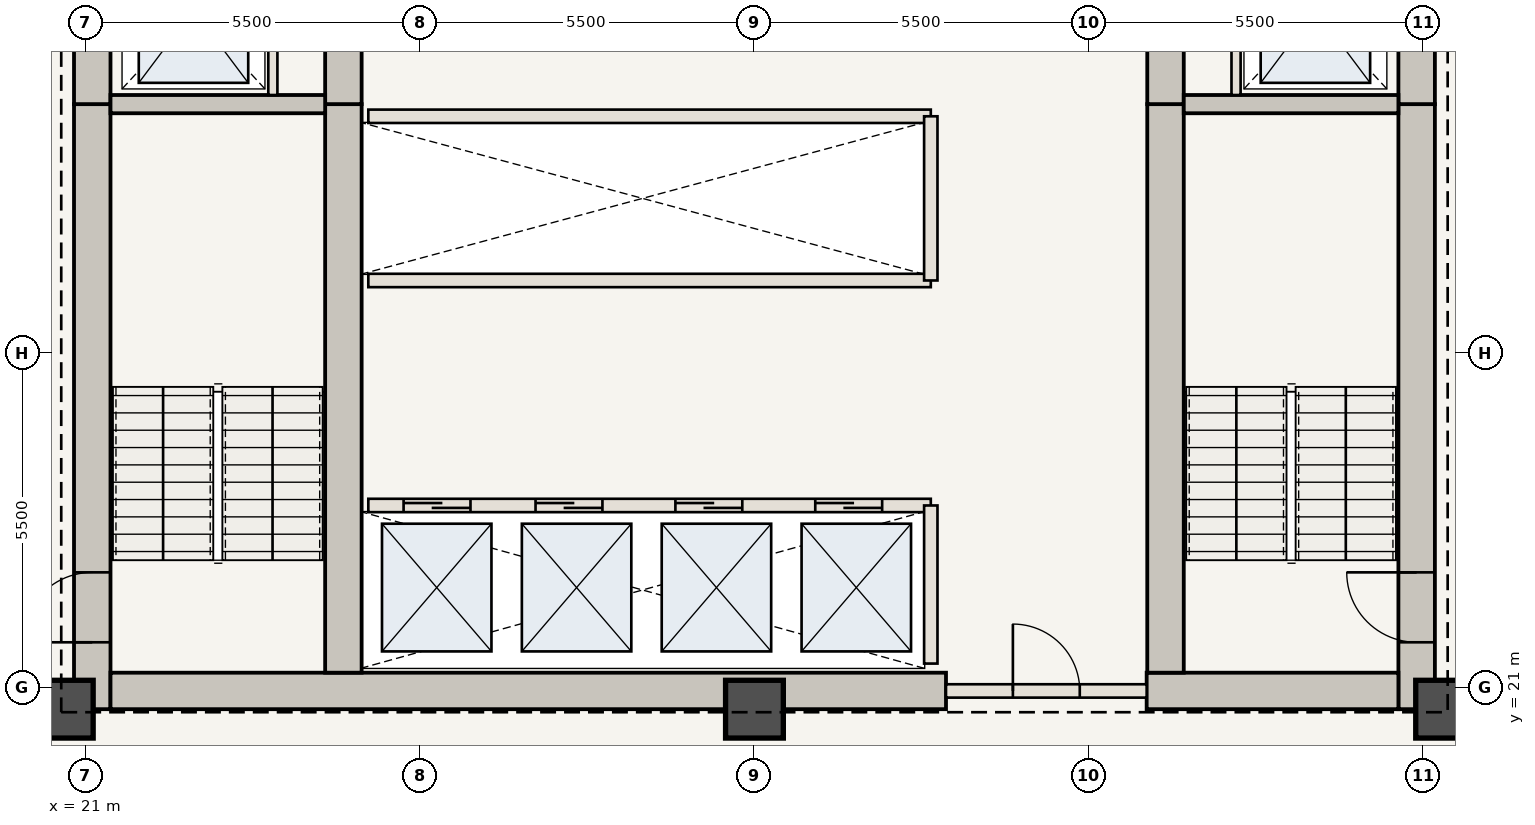
"""IFC4 building model, lengths in metres.
Left out: names, types, materials, properties, quantities, classifications, styles, units other than length and angle.
Written with IfcOpenShell. Run it as: python <this file> out.ifc"""

import sys

from ifc_helpers import new_model, si_unit, direction, frame, frame_2d, origin, origin_2d, place, context, subcontext, project, spatial, rectangle, extrude, element, fill, save


model = new_model("IFC4")
c1 = context("Model", 3, precision=1e-05, world=origin(), true_north=direction((0.0, 1.0)))
c2 = subcontext(c1, "Body", "Model", "MODEL_VIEW")
j1 = project(units=[si_unit("LENGTHUNIT", "METRE"), si_unit("PLANEANGLEUNIT", "RADIAN")], contexts=[c1])
p1 = place(None, origin())
s1 = spatial("IfcSite", under=j1, at=p1, CompositionType="ELEMENT")
p2 = place(p1, origin())
s2 = spatial("IfcBuilding", under=s1, at=p2, CompositionType="ELEMENT")
p3 = place(p2, frame((0.0, 0.0, 129.85)))
s3 = spatial("IfcBuildingStorey", under=s2, at=p3, CompositionType="ELEMENT", Elevation=129.85)
p4 = place(p3, frame((21.11, 20.65, 0.0), z_axis=(0.0, 0.0, 1.0), x_axis=(0.0, 1.0, 0.0)))
e1 = element("IfcWall", 1, at=p4, inside=s3, PredefinedType="SHEAR", context=c2, shape_type="SweptSolid", body=[
    extrude(rectangle(XDim=9.95, YDim=0.6, at=frame_2d((4.975, 0.0))), origin(), (0.0, 0.0, 1.0), 3.85),
])
p5 = place(p4, frame((1.1, 0.0, 0.0)))
e2 = element("IfcOpeningElement", 2, at=p5, cuts=e1, PredefinedType="OPENING", context=c2, shape_type="SweptSolid", body=[
    extrude(rectangle(XDim=1.15, YDim=2.15, at=frame_2d((0.575, 1.075))), frame((0.0, 0.31, 0.0), z_axis=(0.0, -1.0, 0.0), x_axis=(1.0, 0.0, 0.0)), (0.0, 0.0, 1.0), 0.62),
])
p6 = place(p3, frame((21.11, 30.6, 0.0), z_axis=(0.0, 0.0, 1.0), x_axis=(0.0, 1.0, 0.0)))
e3 = element("IfcWall", 3, at=p6, inside=s3, PredefinedType="SHEAR", context=c2, shape_type="SweptSolid", body=[
    extrude(rectangle(XDim=12.7, YDim=0.6, at=frame_2d((6.35, 0.0))), origin(), (0.0, 0.0, 1.0), 3.85),
])
p7 = place(p6, frame((4.2, 0.0, 0.0)))
e4 = element("IfcOpeningElement", 4, at=p7, cuts=e3, PredefinedType="OPENING", context=c2, shape_type="SweptSolid", body=[
    extrude(rectangle(XDim=1.1, YDim=2.15, at=frame_2d((0.55, 1.075))), frame((0.0, 0.31, 0.0), z_axis=(0.0, -1.0, 0.0), x_axis=(1.0, 0.0, 0.0)), (0.0, 0.0, 1.0), 0.62),
])
p8 = place(p6, frame((9.2, 0.0, 0.0)))
e5 = element("IfcOpeningElement", 5, at=p8, cuts=e3, PredefinedType="OPENING", context=c2, shape_type="SweptSolid", body=[
    extrude(rectangle(XDim=0.92, YDim=2.1, at=frame_2d((0.46, 1.05))), frame((0.0, 0.31, 0.0), z_axis=(0.0, -1.0, 0.0), x_axis=(1.0, 0.0, 0.0)), (0.0, 0.0, 1.0), 0.62),
])
p9 = place(p3, frame((42.89, 20.65, 0.0), z_axis=(0.0, 0.0, 1.0), x_axis=(0.0, 1.0, 0.0)))
e6 = element("IfcWall", 6, at=p9, inside=s3, PredefinedType="SHEAR", context=c2, shape_type="SweptSolid", body=[
    extrude(rectangle(XDim=9.95, YDim=0.6, at=frame_2d((4.975, 0.0))), origin(), (0.0, 0.0, 1.0), 3.85),
])
p10 = place(p9, frame((1.1, 0.0, 0.0)))
e7 = element("IfcOpeningElement", 7, at=p10, cuts=e6, PredefinedType="OPENING", context=c2, shape_type="SweptSolid", body=[
    extrude(rectangle(XDim=1.15, YDim=2.15, at=frame_2d((0.575, 1.075))), frame((0.0, 0.31, 0.0), z_axis=(0.0, -1.0, 0.0), x_axis=(1.0, 0.0, 0.0)), (0.0, 0.0, 1.0), 0.62),
])
p11 = place(p3, frame((42.89, 30.6, 0.0), z_axis=(0.0, 0.0, 1.0), x_axis=(0.0, 1.0, 0.0)))
e8 = element("IfcWall", 8, at=p11, inside=s3, PredefinedType="SHEAR", context=c2, shape_type="SweptSolid", body=[
    extrude(rectangle(XDim=12.7, YDim=0.6, at=frame_2d((6.35, 0.0))), origin(), (0.0, 0.0, 1.0), 3.85),
])
p12 = place(p11, frame((4.2, 0.0, 0.0)))
e9 = element("IfcOpeningElement", 9, at=p12, cuts=e8, PredefinedType="OPENING", context=c2, shape_type="SweptSolid", body=[
    extrude(rectangle(XDim=1.1, YDim=2.15, at=frame_2d((0.55, 1.075))), frame((0.0, 0.31, 0.0), z_axis=(0.0, -1.0, 0.0), x_axis=(1.0, 0.0, 0.0)), (0.0, 0.0, 1.0), 0.62),
])
p13 = place(p11, frame((8.05, 0.0, 0.0)))
e10 = element("IfcOpeningElement", 10, at=p13, cuts=e8, PredefinedType="OPENING", context=c2, shape_type="SweptSolid", body=[
    extrude(rectangle(XDim=0.88, YDim=2.1, at=frame_2d((0.44, 1.05))), frame((0.0, 0.31, 0.0), z_axis=(0.0, -1.0, 0.0), x_axis=(1.0, 0.0, 0.0)), (0.0, 0.0, 1.0), 0.62),
])
p14 = place(p11, frame((9.45, 0.0, 0.0)))
e11 = element("IfcOpeningElement", 11, at=p14, cuts=e8, PredefinedType="OPENING", context=c2, shape_type="SweptSolid", body=[
    extrude(rectangle(XDim=0.88, YDim=2.1, at=frame_2d((0.44, 1.05))), frame((0.0, 0.31, 0.0), z_axis=(0.0, -1.0, 0.0), x_axis=(1.0, 0.0, 0.0)), (0.0, 0.0, 1.0), 0.62),
])
p15 = place(p11, frame((10.85, 0.0, 0.0)))
e12 = element("IfcOpeningElement", 12, at=p15, cuts=e8, PredefinedType="OPENING", context=c2, shape_type="SweptSolid", body=[
    extrude(rectangle(XDim=0.88, YDim=2.1, at=frame_2d((0.44, 1.05))), frame((0.0, 0.31, 0.0), z_axis=(0.0, -1.0, 0.0), x_axis=(1.0, 0.0, 0.0)), (0.0, 0.0, 1.0), 0.62),
])
p16 = place(p3, frame((21.41, 20.95, 0.0), z_axis=(0.0, 0.0, 1.0), x_axis=(1.0, 0.0, 0.0)))
e13 = element("IfcWall", 13, at=p16, inside=s3, PredefinedType="SHEAR", context=c2, shape_type="SweptSolid", body=[
    extrude(rectangle(XDim=13.74, YDim=0.6, at=frame_2d((6.87, 0.0))), origin(), (0.0, 0.0, 1.0), 3.85),
])
p17 = place(p3, frame((38.45, 20.95, 0.0), z_axis=(0.0, 0.0, 1.0), x_axis=(1.0, 0.0, 0.0)))
e14 = element("IfcWall", 14, at=p17, inside=s3, PredefinedType="SHEAR", context=c2, shape_type="SweptSolid", body=[
    extrude(rectangle(XDim=4.14, YDim=0.6, at=frame_2d((2.07, 0.0))), origin(), (0.0, 0.0, 1.0), 3.85),
])
p18 = place(p3, frame((25.24, 21.25, 0.0), z_axis=(0.0, 0.0, 1.0), x_axis=(0.0, 1.0, 0.0)))
e15 = element("IfcWall", 15, at=p18, inside=s3, PredefinedType="SHEAR", context=c2, shape_type="SweptSolid", body=[
    extrude(rectangle(XDim=9.35, YDim=0.6, at=frame_2d((4.675, 0.0))), origin(), (0.0, 0.0, 1.0), 3.85),
])
p19 = place(p3, frame((25.24, 30.6, 0.0), z_axis=(0.0, 0.0, 1.0), x_axis=(0.0, 1.0, 0.0)))
e16 = element("IfcWall", 16, at=p19, inside=s3, PredefinedType="SHEAR", context=c2, shape_type="SweptSolid", body=[
    extrude(rectangle(XDim=12.1, YDim=0.6, at=frame_2d((6.05, 0.0))), origin(), (0.0, 0.0, 1.0), 3.85),
])
p20 = place(p19, frame((6.25, 0.0, 0.0)))
e17 = element("IfcOpeningElement", 17, at=p20, cuts=e16, PredefinedType="OPENING", context=c2, shape_type="SweptSolid", body=[
    extrude(rectangle(XDim=1.1, YDim=2.15, at=frame_2d((0.55, 1.075))), frame((0.0, 0.31, 0.0), z_axis=(0.0, -1.0, 0.0), x_axis=(1.0, 0.0, 0.0)), (0.0, 0.0, 1.0), 0.62),
])
p21 = place(p3, frame((38.76, 21.25, 0.0), z_axis=(0.0, 0.0, 1.0), x_axis=(0.0, 1.0, 0.0)))
e18 = element("IfcWall", 18, at=p21, inside=s3, PredefinedType="SHEAR", context=c2, shape_type="SweptSolid", body=[
    extrude(rectangle(XDim=9.35, YDim=0.6, at=frame_2d((4.675, 0.0))), origin(), (0.0, 0.0, 1.0), 3.85),
])
p22 = place(p3, frame((38.76, 30.6, 0.0), z_axis=(0.0, 0.0, 1.0), x_axis=(0.0, 1.0, 0.0)))
e19 = element("IfcWall", 19, at=p22, inside=s3, PredefinedType="SHEAR", context=c2, shape_type="SweptSolid", body=[
    extrude(rectangle(XDim=12.1, YDim=0.6, at=frame_2d((6.05, 0.0))), origin(), (0.0, 0.0, 1.0), 3.85),
])
for number, where, z_axis, x_axis in (
    (20, (20.65, 20.65, 0.0), (0.0, 0.0, 1.0), (1.0, 0.0, 0.0)),
    (21, (32.0, 20.65, 0.0), (0.0, 0.0, 1.0), (1.0, 0.0, 0.0)),
    (22, (43.35, 20.65, 0.0), (0.0, 0.0, 1.0), (1.0, 0.0, 0.0)),
):
    element("IfcColumn", number, at=place(p3, frame(where, z_axis=z_axis, x_axis=x_axis)), inside=s3, PredefinedType="COLUMN", context=c2, shape_type="SweptSolid", body=[
        extrude(rectangle(XDim=0.95, YDim=0.95, at=origin_2d()), origin(), (0.0, 0.0, 1.0), 3.85),
    ])
for number, where, z_axis, x_axis in (
    (23, (21.41, 30.6, 0.0), (0.0, 0.0, 1.0), (1.0, 0.0, 0.0)),
    (24, (39.06, 30.6, 0.0), (0.0, 0.0, 1.0), (1.0, 0.0, 0.0)),
):
    element("IfcWall", number, at=place(p3, frame(where, z_axis=z_axis, x_axis=x_axis)), inside=s3, PredefinedType="SHEAR", context=c2, shape_type="SweptSolid", body=[
        extrude(rectangle(XDim=3.53, YDim=0.3, at=frame_2d((1.765, 0.0))), origin(), (0.0, 0.0, 1.0), 3.685),
    ])
for number, where, z_axis, x_axis in (
    (25, (24.08, 30.75, 0.0), (0.0, 0.0, 1.0), (0.0, 1.0, 0.0)),
    (26, (39.92, 30.75, 0.0), (0.0, 0.0, 1.0), (0.0, 1.0, 0.0)),
):
    element("IfcWall", number, at=place(p3, frame(where, z_axis=z_axis, x_axis=x_axis)), inside=s3, PredefinedType="STANDARD", context=c2, shape_type="SweptSolid", body=[
        extrude(rectangle(XDim=2.65, YDim=0.15, at=frame_2d((1.325, 0.0))), origin(), (0.0, 0.0, 1.0), 3.685),
    ])
p23 = place(p3, frame((35.15, 20.95, 0.0), z_axis=(0.0, 0.0, 1.0), x_axis=(1.0, 0.0, 0.0)))
e27 = element("IfcWall", 27, at=p23, inside=s3, PredefinedType="STANDARD", context=c2, shape_type="SweptSolid", body=[
    extrude(rectangle(XDim=3.3, YDim=0.22, at=frame_2d((1.65, 0.0))), origin(), (0.0, 0.0, 1.0), 3.685),
])
p24 = place(p23, frame((1.1, 0.0, 0.0)))
e28 = element("IfcOpeningElement", 28, at=p24, cuts=e27, PredefinedType="OPENING", context=c2, shape_type="SweptSolid", body=[
    extrude(rectangle(XDim=1.1, YDim=2.15, at=frame_2d((0.55, 1.075))), frame((0.0, 0.12, 0.0), z_axis=(0.0, -1.0, 0.0), x_axis=(1.0, 0.0, 0.0)), (0.0, 0.0, 1.0), 0.24),
])
p25 = place(p3, frame((25.65, 24.0, 0.0), z_axis=(0.0, 0.0, 1.0), x_axis=(1.0, 0.0, 0.0)))
e29 = element("IfcWall", 29, at=p25, inside=s3, PredefinedType="STANDARD", context=c2, shape_type="SweptSolid", body=[
    extrude(rectangle(XDim=9.25, YDim=0.22, at=frame_2d((4.625, 0.0))), origin(), (0.0, 0.0, 1.0), 3.685),
])
p26 = place(p25, frame((0.58, 0.0, 0.0)))
e30 = element("IfcOpeningElement", 30, at=p26, cuts=e29, PredefinedType="OPENING", context=c2, shape_type="SweptSolid", body=[
    extrude(rectangle(XDim=1.1, YDim=2.15, at=frame_2d((0.55, 1.075))), frame((0.0, 0.12, 0.0), z_axis=(0.0, -1.0, 0.0), x_axis=(1.0, 0.0, 0.0)), (0.0, 0.0, 1.0), 0.24),
])
p27 = place(p25, frame((2.75, 0.0, 0.0)))
e31 = element("IfcOpeningElement", 31, at=p27, cuts=e29, PredefinedType="OPENING", context=c2, shape_type="SweptSolid", body=[
    extrude(rectangle(XDim=1.1, YDim=2.15, at=frame_2d((0.55, 1.075))), frame((0.0, 0.12, 0.0), z_axis=(0.0, -1.0, 0.0), x_axis=(1.0, 0.0, 0.0)), (0.0, 0.0, 1.0), 0.24),
])
p28 = place(p25, frame((5.05, 0.0, 0.0)))
e32 = element("IfcOpeningElement", 32, at=p28, cuts=e29, PredefinedType="OPENING", context=c2, shape_type="SweptSolid", body=[
    extrude(rectangle(XDim=1.1, YDim=2.15, at=frame_2d((0.55, 1.075))), frame((0.0, 0.12, 0.0), z_axis=(0.0, -1.0, 0.0), x_axis=(1.0, 0.0, 0.0)), (0.0, 0.0, 1.0), 0.24),
])
p29 = place(p25, frame((7.35, 0.0, 0.0)))
e33 = element("IfcOpeningElement", 33, at=p29, cuts=e29, PredefinedType="OPENING", context=c2, shape_type="SweptSolid", body=[
    extrude(rectangle(XDim=1.1, YDim=2.15, at=frame_2d((0.55, 1.075))), frame((0.0, 0.12, 0.0), z_axis=(0.0, -1.0, 0.0), x_axis=(1.0, 0.0, 0.0)), (0.0, 0.0, 1.0), 0.24),
])
p30 = place(p3, frame((34.9, 21.4, 0.0), z_axis=(0.0, 0.0, 1.0), x_axis=(0.0, 1.0, 0.0)))
e34 = element("IfcWall", 34, at=p30, inside=s3, PredefinedType="STANDARD", context=c2, shape_type="SweptSolid", body=[
    extrude(rectangle(XDim=2.6, YDim=0.22, at=frame_2d((1.3, 0.0))), origin(), (0.0, 0.0, 1.0), 3.685),
])
for number, where, z_axis, x_axis in (
    (35, (25.65, 27.7, 0.0), (0.0, 0.0, 1.0), (1.0, 0.0, 0.0)),
    (36, (25.65, 30.4, 0.0), (0.0, 0.0, 1.0), (1.0, 0.0, 0.0)),
):
    element("IfcWall", number, at=place(p3, frame(where, z_axis=z_axis, x_axis=x_axis)), inside=s3, PredefinedType="STANDARD", context=c2, shape_type="SweptSolid", body=[
        extrude(rectangle(XDim=9.25, YDim=0.22, at=frame_2d((4.625, 0.0))), origin(), (0.0, 0.0, 1.0), 3.685),
    ])
p31 = place(p3, frame((34.9, 27.7, 0.0), z_axis=(0.0, 0.0, 1.0), x_axis=(0.0, 1.0, 0.0)))
e37 = element("IfcWall", 37, at=p31, inside=s3, PredefinedType="STANDARD", context=c2, shape_type="SweptSolid", body=[
    extrude(rectangle(XDim=2.7, YDim=0.22, at=frame_2d((1.35, 0.0))), origin(), (0.0, 0.0, 1.0), 3.685),
])
p32 = place(p5, origin())
e38 = element("IfcDoor", 38, at=p32, inside=s3, OperationType="SINGLE_SWING_LEFT", PredefinedType="DOOR", context=c2, shape_type="SweptSolid", body=[
    extrude(rectangle(XDim=1.15, YDim=2.15, at=frame_2d((0.575, 1.075))), frame((0.0, 0.025, 0.0), z_axis=(0.0, -1.0, 0.0), x_axis=(1.0, 0.0, 0.0)), (0.0, 0.0, 1.0), 0.05),
])
fill(e2, e38)
p33 = place(p10, origin())
e39 = element("IfcDoor", 39, at=p33, inside=s3, OperationType="SINGLE_SWING_RIGHT", PredefinedType="DOOR", context=c2, shape_type="SweptSolid", body=[
    extrude(rectangle(XDim=1.15, YDim=2.15, at=frame_2d((0.575, 1.075))), frame((0.0, 0.025, 0.0), z_axis=(0.0, -1.0, 0.0), x_axis=(1.0, 0.0, 0.0)), (0.0, 0.0, 1.0), 0.05),
])
fill(e7, e39)
p34 = place(p24, origin())
e40 = element("IfcDoor", 40, at=p34, inside=s3, OperationType="SINGLE_SWING_LEFT", PredefinedType="DOOR", context=c2, shape_type="SweptSolid", body=[
    extrude(rectangle(XDim=1.1, YDim=2.15, at=frame_2d((0.55, 1.075))), frame((0.0, 0.025, 0.0), z_axis=(0.0, -1.0, 0.0), x_axis=(1.0, 0.0, 0.0)), (0.0, 0.0, 1.0), 0.05),
])
fill(e28, e40)
p35 = place(p26, origin())
e41 = element("IfcDoor", 41, at=p35, inside=s3, OperationType="DOUBLE_DOOR_SLIDING", PredefinedType="DOOR", context=c2, shape_type="SweptSolid", body=[
    extrude(rectangle(XDim=1.1, YDim=2.15, at=frame_2d((0.55, 1.075))), frame((0.0, 0.025, 0.0), z_axis=(0.0, -1.0, 0.0), x_axis=(1.0, 0.0, 0.0)), (0.0, 0.0, 1.0), 0.05),
])
fill(e30, e41)
p36 = place(p27, origin())
e42 = element("IfcDoor", 42, at=p36, inside=s3, OperationType="DOUBLE_DOOR_SLIDING", PredefinedType="DOOR", context=c2, shape_type="SweptSolid", body=[
    extrude(rectangle(XDim=1.1, YDim=2.15, at=frame_2d((0.55, 1.075))), frame((0.0, 0.025, 0.0), z_axis=(0.0, -1.0, 0.0), x_axis=(1.0, 0.0, 0.0)), (0.0, 0.0, 1.0), 0.05),
])
fill(e31, e42)
p37 = place(p28, origin())
e43 = element("IfcDoor", 43, at=p37, inside=s3, OperationType="DOUBLE_DOOR_SLIDING", PredefinedType="DOOR", context=c2, shape_type="SweptSolid", body=[
    extrude(rectangle(XDim=1.1, YDim=2.15, at=frame_2d((0.55, 1.075))), frame((0.0, 0.025, 0.0), z_axis=(0.0, -1.0, 0.0), x_axis=(1.0, 0.0, 0.0)), (0.0, 0.0, 1.0), 0.05),
])
fill(e32, e43)
p38 = place(p29, origin())
e44 = element("IfcDoor", 44, at=p38, inside=s3, OperationType="DOUBLE_DOOR_SLIDING", PredefinedType="DOOR", context=c2, shape_type="SweptSolid", body=[
    extrude(rectangle(XDim=1.1, YDim=2.15, at=frame_2d((0.55, 1.075))), frame((0.0, 0.025, 0.0), z_axis=(0.0, -1.0, 0.0), x_axis=(1.0, 0.0, 0.0)), (0.0, 0.0, 1.0), 0.05),
])
fill(e33, e44)
save(model, sys.argv[1])
